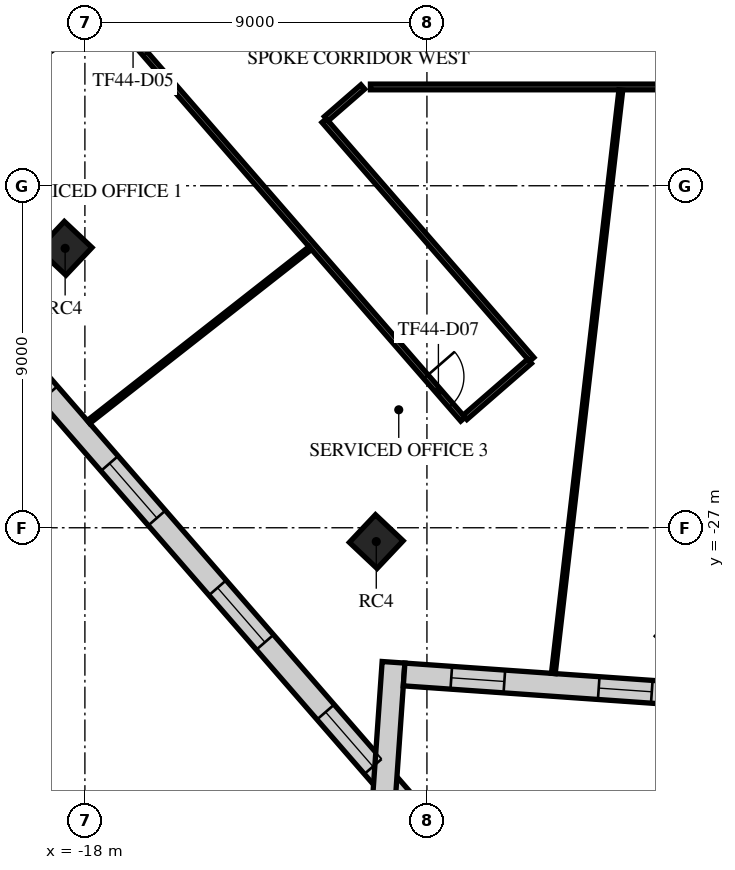
"""IFC4 building model, lengths in metres.
Left out: names, types, materials, properties, quantities, classifications, styles, units other than length and angle.
Written with IfcOpenShell. Run it as: python <this file> out.ifc"""

import sys

from ifc_helpers import new_model, si_unit, direction, frame, frame_2d, origin, origin_2d, place, context, subcontext, project, spatial, rectangle, extrude, element, fill, save


model = new_model("IFC4")
c1 = context("Model", 3, precision=1e-05, world=origin(), true_north=direction((0.0, 1.0)))
c2 = subcontext(c1, "Body", "Model", "MODEL_VIEW")
j1 = project(units=[si_unit("LENGTHUNIT", "METRE"), si_unit("PLANEANGLEUNIT", "RADIAN")], contexts=[c1])
p1 = place(None, origin())
s1 = spatial("IfcSite", under=j1, at=p1, CompositionType="ELEMENT")
p2 = place(p1, origin())
s2 = spatial("IfcBuilding", under=s1, at=p2, CompositionType="ELEMENT")
p3 = place(p2, frame((0.0, 0.0, 189.3)))
s3 = spatial("IfcBuildingStorey", under=s2, at=p3, CompositionType="ELEMENT", Elevation=189.3)
for number, where, z_axis, x_axis in (
    (1, (-18.52, -19.647, -0.38), (0.0, 0.0, 1.0), (0.686, 0.728, 0.0)),
    (2, (-10.333, -27.364, -0.38), (0.0, 0.0, 1.0), (0.686, 0.728, 0.0)),
):
    element("IfcColumn", number, at=place(p3, frame(where, z_axis=z_axis, x_axis=x_axis)), inside=s3, PredefinedType="COLUMN", context=c2, shape_type="SweptSolid", body=[
        extrude(rectangle(XDim=1.0, YDim=1.0, at=origin_2d()), origin(), (0.0, 0.0, 1.0), 4.38),
    ])
p4 = place(p3, frame((-35.208, -4.768, 0.0), z_axis=(0.0, 0.0, 1.0), x_axis=(0.656058749455, -0.754709823219, 0.0)))
e3 = element("IfcWall", 3, at=p4, inside=s3, PredefinedType="STANDARD", context=c2, shape_type="SweptSolid", body=[
    extrude(rectangle(XDim=39.0, YDim=0.6, at=frame_2d((19.5, 0.0))), origin(), (0.0, 0.0, 1.0), 3.62),
])
p5 = place(p4, frame((1.217, 0.0, 0.9)))
e4 = element("IfcOpeningElement", 4, at=p5, cuts=e3, PredefinedType="OPENING", context=c2, shape_type="SweptSolid", body=[
    extrude(rectangle(XDim=1.9, YDim=2.1, at=frame_2d((0.95, 1.05))), frame((0.0, 0.31, 0.0), z_axis=(0.0, -1.0, 0.0), x_axis=(1.0, 0.0, 0.0)), (0.0, 0.0, 1.0), 0.62),
])
p6 = place(p4, frame((5.55, 0.0, 0.9)))
e5 = element("IfcOpeningElement", 5, at=p6, cuts=e3, PredefinedType="OPENING", context=c2, shape_type="SweptSolid", body=[
    extrude(rectangle(XDim=1.9, YDim=2.1, at=frame_2d((0.95, 1.05))), frame((0.0, 0.31, 0.0), z_axis=(0.0, -1.0, 0.0), x_axis=(1.0, 0.0, 0.0)), (0.0, 0.0, 1.0), 0.62),
])
p7 = place(p4, frame((9.883, 0.0, 0.9)))
e6 = element("IfcOpeningElement", 6, at=p7, cuts=e3, PredefinedType="OPENING", context=c2, shape_type="SweptSolid", body=[
    extrude(rectangle(XDim=1.9, YDim=2.1, at=frame_2d((0.95, 1.05))), frame((0.0, 0.31, 0.0), z_axis=(0.0, -1.0, 0.0), x_axis=(1.0, 0.0, 0.0)), (0.0, 0.0, 1.0), 0.62),
])
p8 = place(p4, frame((14.217, 0.0, 0.9)))
e7 = element("IfcOpeningElement", 7, at=p8, cuts=e3, PredefinedType="OPENING", context=c2, shape_type="SweptSolid", body=[
    extrude(rectangle(XDim=1.9, YDim=2.1, at=frame_2d((0.95, 1.05))), frame((0.0, 0.31, 0.0), z_axis=(0.0, -1.0, 0.0), x_axis=(1.0, 0.0, 0.0)), (0.0, 0.0, 1.0), 0.62),
])
p9 = place(p4, frame((18.55, 0.0, 0.9)))
e8 = element("IfcOpeningElement", 8, at=p9, cuts=e3, PredefinedType="OPENING", context=c2, shape_type="SweptSolid", body=[
    extrude(rectangle(XDim=1.9, YDim=2.1, at=frame_2d((0.95, 1.05))), frame((0.0, 0.31, 0.0), z_axis=(0.0, -1.0, 0.0), x_axis=(1.0, 0.0, 0.0)), (0.0, 0.0, 1.0), 0.62),
])
p10 = place(p4, frame((22.883, 0.0, 0.9)))
e9 = element("IfcOpeningElement", 9, at=p10, cuts=e3, PredefinedType="OPENING", context=c2, shape_type="SweptSolid", body=[
    extrude(rectangle(XDim=1.9, YDim=2.1, at=frame_2d((0.95, 1.05))), frame((0.0, 0.31, 0.0), z_axis=(0.0, -1.0, 0.0), x_axis=(1.0, 0.0, 0.0)), (0.0, 0.0, 1.0), 0.62),
])
p11 = place(p4, frame((27.217, 0.0, 0.9)))
e10 = element("IfcOpeningElement", 10, at=p11, cuts=e3, PredefinedType="OPENING", context=c2, shape_type="SweptSolid", body=[
    extrude(rectangle(XDim=1.9, YDim=2.1, at=frame_2d((0.95, 1.05))), frame((0.0, 0.31, 0.0), z_axis=(0.0, -1.0, 0.0), x_axis=(1.0, 0.0, 0.0)), (0.0, 0.0, 1.0), 0.62),
])
p12 = place(p4, frame((31.55, 0.0, 0.9)))
e11 = element("IfcOpeningElement", 11, at=p12, cuts=e3, PredefinedType="OPENING", context=c2, shape_type="SweptSolid", body=[
    extrude(rectangle(XDim=1.9, YDim=2.1, at=frame_2d((0.95, 1.05))), frame((0.0, 0.31, 0.0), z_axis=(0.0, -1.0, 0.0), x_axis=(1.0, 0.0, 0.0)), (0.0, 0.0, 1.0), 0.62),
])
p13 = place(p4, frame((35.883, 0.0, 0.9)))
e12 = element("IfcOpeningElement", 12, at=p13, cuts=e3, PredefinedType="OPENING", context=c2, shape_type="SweptSolid", body=[
    extrude(rectangle(XDim=1.9, YDim=2.1, at=frame_2d((0.95, 1.05))), frame((0.0, 0.31, 0.0), z_axis=(0.0, -1.0, 0.0), x_axis=(1.0, 0.0, 0.0)), (0.0, 0.0, 1.0), 0.62),
])
p14 = place(p3, frame((-10.147, -34.378, 0.0), z_axis=(0.0, 0.0, 1.0), x_axis=(0.069753966021, 0.997564225614, 0.0)))
e13 = element("IfcWall", 13, at=p14, inside=s3, PredefinedType="STANDARD", context=c2, shape_type="SweptSolid", body=[
    extrude(rectangle(XDim=3.846, YDim=0.6, at=frame_2d((1.923, 0.0))), origin(), (0.0, 0.0, 1.0), 3.62),
])
p15 = place(p3, frame((-9.601, -30.861, 0.0), z_axis=(0.0, 0.0, 1.0), x_axis=(0.997564801601, -0.069745728239, 0.0)))
e14 = element("IfcWall", 14, at=p15, inside=s3, PredefinedType="STANDARD", context=c2, shape_type="SweptSolid", body=[
    extrude(rectangle(XDim=7.778, YDim=0.6, at=frame_2d((3.889, 0.0))), origin(), (0.0, 0.0, 1.0), 3.62),
])
p16 = place(p15, frame((1.244, 0.0, 0.9)))
e15 = element("IfcOpeningElement", 15, at=p16, cuts=e14, PredefinedType="OPENING", context=c2, shape_type="SweptSolid", body=[
    extrude(rectangle(XDim=1.4, YDim=2.1, at=frame_2d((0.7, 1.05))), frame((0.0, 0.31, 0.0), z_axis=(0.0, -1.0, 0.0), x_axis=(1.0, 0.0, 0.0)), (0.0, 0.0, 1.0), 0.62),
])
p17 = place(p15, frame((5.134, 0.0, 0.9)))
e16 = element("IfcOpeningElement", 16, at=p17, cuts=e14, PredefinedType="OPENING", context=c2, shape_type="SweptSolid", body=[
    extrude(rectangle(XDim=1.4, YDim=2.1, at=frame_2d((0.7, 1.05))), frame((0.0, 0.31, 0.0), z_axis=(0.0, -1.0, 0.0), x_axis=(1.0, 0.0, 0.0)), (0.0, 0.0, 1.0), 0.62),
])
p18 = place(p3, frame((-24.98, -4.673, 0.0), z_axis=(0.0, 0.0, 1.0), x_axis=(0.656048444225, -0.754718781289, 0.0)))
e17 = element("IfcWall", 17, at=p18, inside=s3, PredefinedType="PARTITIONING", context=c2, shape_type="SweptSolid", body=[
    extrude(rectangle(XDim=25.8, YDim=0.15, at=frame_2d((12.9, 0.0))), origin(), (0.0, 0.0, 1.0), 3.17),
])
p19 = place(p18, frame((12.071, 0.0, 0.0)))
e18 = element("IfcOpeningElement", 18, at=p19, cuts=e17, PredefinedType="OPENING", context=c2, shape_type="SweptSolid", body=[
    extrude(rectangle(XDim=1.0, YDim=2.1, at=frame_2d((0.5, 1.05))), frame((0.0, 0.085, 0.0), z_axis=(0.0, -1.0, 0.0), x_axis=(1.0, 0.0, 0.0)), (0.0, 0.0, 1.0), 0.17),
])
p20 = place(p18, frame((24.318, 0.0, 0.0)))
e19 = element("IfcOpeningElement", 19, at=p20, cuts=e17, PredefinedType="OPENING", context=c2, shape_type="SweptSolid", body=[
    extrude(rectangle(XDim=1.0, YDim=2.1, at=frame_2d((0.5, 1.05))), frame((0.0, 0.085, 0.0), z_axis=(0.0, -1.0, 0.0), x_axis=(1.0, 0.0, 0.0)), (0.0, 0.0, 1.0), 0.17),
])
p21 = place(p3, frame((-11.705, -16.285, 0.0), z_axis=(0.0, 0.0, 1.0), x_axis=(0.656018266208, -0.754745012837, 0.0)))
e20 = element("IfcWall", 20, at=p21, inside=s3, PredefinedType="PARTITIONING", context=c2, shape_type="SweptSolid", body=[
    extrude(rectangle(XDim=8.326, YDim=0.15, at=frame_2d((4.163, 0.0))), origin(), (0.0, 0.0, 1.0), 3.17),
])
p22 = place(p3, frame((-11.648, -16.236, 0.0), z_axis=(0.0, 0.0, 1.0), x_axis=(0.754638525281, 0.656140759412, 0.0)))
e21 = element("IfcWall", 21, at=p22, inside=s3, PredefinedType="PARTITIONING", context=c2, shape_type="SweptSolid", body=[
    extrude(rectangle(XDim=1.274, YDim=0.15, at=frame_2d((0.637, 0.0))), origin(), (0.0, 0.0, 1.0), 3.17),
])
p23 = place(p3, frame((-10.486, -15.4, 0.0), z_axis=(0.0, 0.0, 1.0), x_axis=(1.0, 0.0, 0.0)))
e22 = element("IfcWall", 22, at=p23, inside=s3, PredefinedType="PARTITIONING", context=c2, shape_type="SweptSolid", body=[
    extrude(rectangle(XDim=17.763, YDim=0.15, at=frame_2d((8.882, 0.0))), origin(), (0.0, 0.0, 1.0), 3.17),
])
p24 = place(p23, frame((14.154, 0.0, 0.0)))
e23 = element("IfcOpeningElement", 23, at=p24, cuts=e22, PredefinedType="OPENING", context=c2, shape_type="SweptSolid", body=[
    extrude(rectangle(XDim=1.0, YDim=2.1, at=frame_2d((0.5, 1.05))), frame((0.0, 0.085, 0.0), z_axis=(0.0, -1.0, 0.0), x_axis=(1.0, 0.0, 0.0)), (0.0, 0.0, 1.0), 0.17),
])
p25 = place(p3, frame((-7.997, -24.095, 0.0), z_axis=(0.0, 0.0, 1.0), x_axis=(0.754549456123, 0.656243185308, 0.0)))
e24 = element("IfcWall", 24, at=p25, inside=s3, PredefinedType="PARTITIONING", context=c2, shape_type="SweptSolid", body=[
    extrude(rectangle(XDim=2.25, YDim=0.15, at=frame_2d((1.125, 0.0))), origin(), (0.0, 0.0, 1.0), 3.17),
])
p26 = place(p3, frame((-23.568, -17.698, 0.0), z_axis=(0.0, 0.0, 1.0), x_axis=(0.817824726915, 0.575467389212, 0.0)))
e25 = element("IfcWall", 25, at=p26, inside=s3, PredefinedType="PARTITIONING", context=c2, shape_type="SweptSolid", body=[
    extrude(rectangle(XDim=7.438, YDim=0.1, at=frame_2d((3.719, 0.0))), origin(), (0.0, 0.0, 1.0), 3.17),
])
p27 = place(p3, frame((-17.903, -24.215, 0.0), z_axis=(0.0, 0.0, 1.0), x_axis=(0.786835853262, 0.617162328744, 0.0)))
e26 = element("IfcWall", 26, at=p27, inside=s3, PredefinedType="PARTITIONING", context=c2, shape_type="SweptSolid", body=[
    extrude(rectangle(XDim=7.412, YDim=0.1, at=frame_2d((3.706, 0.0))), origin(), (0.0, 0.0, 1.0), 3.17),
])
p28 = place(p3, frame((-5.674, -30.833, 0.0), z_axis=(0.0, 0.0, 1.0), x_axis=(0.114957483757, 0.993370412751, 0.0)))
e27 = element("IfcWall", 27, at=p28, inside=s3, PredefinedType="PARTITIONING", context=c2, shape_type="SweptSolid", body=[
    extrude(rectangle(XDim=15.455, YDim=0.1, at=frame_2d((7.727, 0.0))), origin(), (0.0, 0.0, 1.0), 3.62),
])
p29 = place(p11, origin())
e28 = element("IfcWindow", 28, at=p29, inside=s3, PartitioningType="SINGLE_PANEL", PredefinedType="WINDOW", context=c2, shape_type="SweptSolid", body=[
    extrude(rectangle(XDim=1.9, YDim=2.1, at=frame_2d((0.95, 1.05))), frame((0.0, 0.03, 0.0), z_axis=(0.0, -1.0, 0.0), x_axis=(1.0, 0.0, 0.0)), (0.0, 0.0, 1.0), 0.06),
])
fill(e10, e28)
p30 = place(p12, origin())
e29 = element("IfcWindow", 29, at=p30, inside=s3, PartitioningType="SINGLE_PANEL", PredefinedType="WINDOW", context=c2, shape_type="SweptSolid", body=[
    extrude(rectangle(XDim=1.9, YDim=2.1, at=frame_2d((0.95, 1.05))), frame((0.0, 0.03, 0.0), z_axis=(0.0, -1.0, 0.0), x_axis=(1.0, 0.0, 0.0)), (0.0, 0.0, 1.0), 0.06),
])
fill(e11, e29)
p31 = place(p13, origin())
e30 = element("IfcWindow", 30, at=p31, inside=s3, PartitioningType="SINGLE_PANEL", PredefinedType="WINDOW", context=c2, shape_type="SweptSolid", body=[
    extrude(rectangle(XDim=1.9, YDim=2.1, at=frame_2d((0.95, 1.05))), frame((0.0, 0.03, 0.0), z_axis=(0.0, -1.0, 0.0), x_axis=(1.0, 0.0, 0.0)), (0.0, 0.0, 1.0), 0.06),
])
fill(e12, e30)
p32 = place(p16, origin())
e31 = element("IfcWindow", 31, at=p32, inside=s3, PartitioningType="SINGLE_PANEL", PredefinedType="WINDOW", context=c2, shape_type="SweptSolid", body=[
    extrude(rectangle(XDim=1.4, YDim=2.1, at=frame_2d((0.7, 1.05))), frame((0.0, 0.03, 0.0), z_axis=(0.0, -1.0, 0.0), x_axis=(1.0, 0.0, 0.0)), (0.0, 0.0, 1.0), 0.06),
])
fill(e15, e31)
p33 = place(p17, origin())
e32 = element("IfcWindow", 32, at=p33, inside=s3, PartitioningType="SINGLE_PANEL", PredefinedType="WINDOW", context=c2, shape_type="SweptSolid", body=[
    extrude(rectangle(XDim=1.4, YDim=2.1, at=frame_2d((0.7, 1.05))), frame((0.0, 0.03, 0.0), z_axis=(0.0, -1.0, 0.0), x_axis=(1.0, 0.0, 0.0)), (0.0, 0.0, 1.0), 0.06),
])
fill(e16, e32)
p34 = place(p19, frame((1.0, 0.0, 0.0), z_axis=(0.0, 0.0, 1.0), x_axis=(-1.0, 0.0, 0.0)))
e33 = element("IfcDoor", 33, at=p34, inside=s3, OperationType="SINGLE_SWING_LEFT", PredefinedType="DOOR", context=c2, shape_type="SweptSolid", body=[
    extrude(rectangle(XDim=1.0, YDim=2.1, at=frame_2d((0.5, 1.05))), frame((0.0, 0.025, 0.0), z_axis=(0.0, -1.0, 0.0), x_axis=(1.0, 0.0, 0.0)), (0.0, 0.0, 1.0), 0.05),
])
fill(e18, e33)
p35 = place(p20, frame((1.0, 0.0, 0.0), z_axis=(0.0, 0.0, 1.0), x_axis=(-1.0, 0.0, 0.0)))
e34 = element("IfcDoor", 34, at=p35, inside=s3, OperationType="SINGLE_SWING_LEFT", PredefinedType="DOOR", context=c2, shape_type="SweptSolid", body=[
    extrude(rectangle(XDim=1.0, YDim=2.1, at=frame_2d((0.5, 1.05))), frame((0.0, 0.025, 0.0), z_axis=(0.0, -1.0, 0.0), x_axis=(1.0, 0.0, 0.0)), (0.0, 0.0, 1.0), 0.05),
])
fill(e19, e34)
save(model, sys.argv[1])
